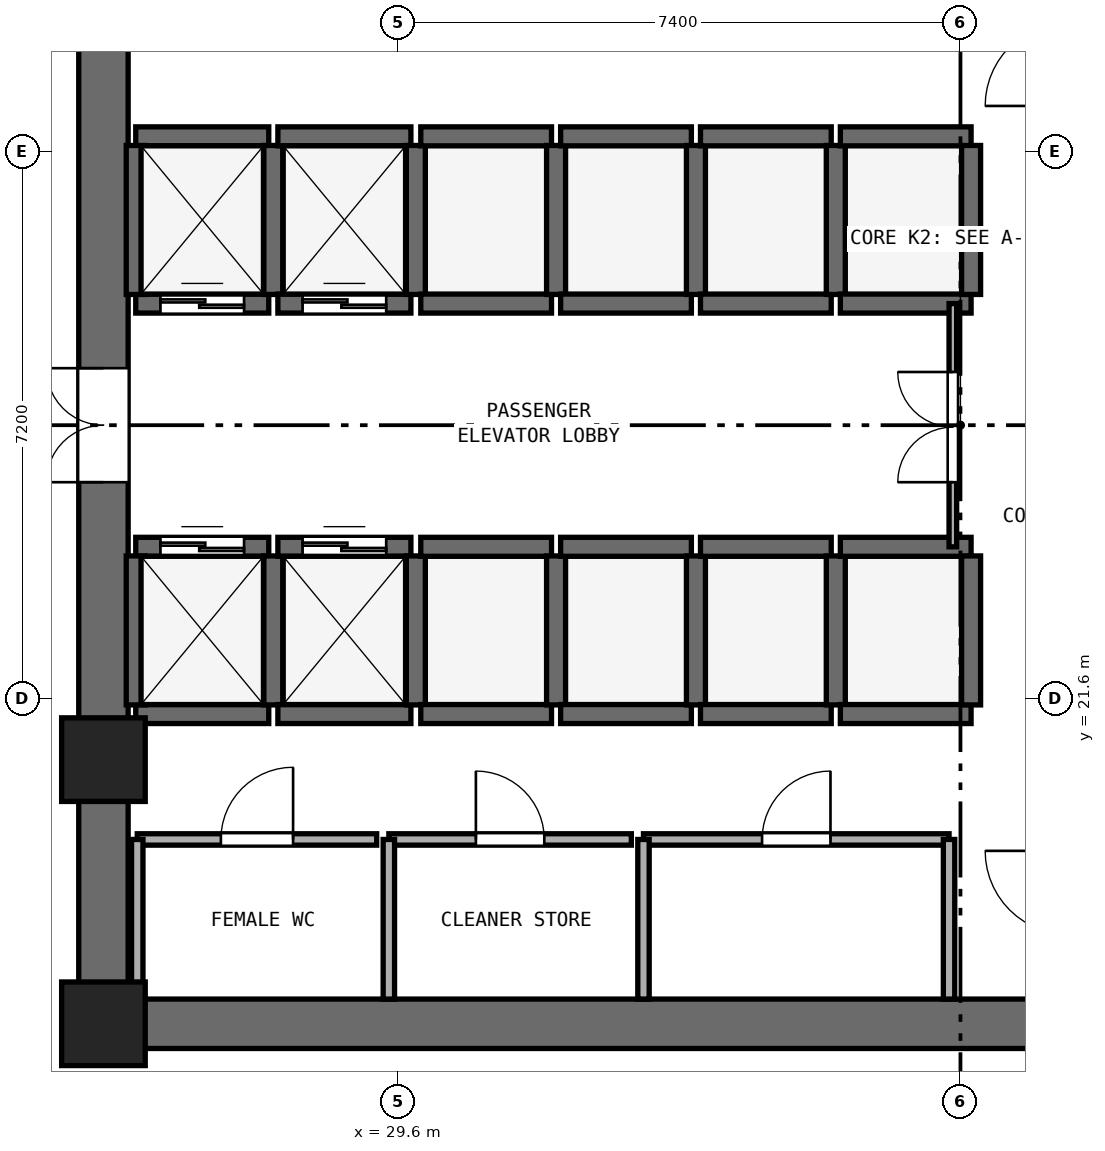
"""IFC4 building model, lengths in metres.
Left out: names, types, materials, properties, quantities, classifications, styles, units other than length and angle.
Written with IfcOpenShell. Run it as: python <this file> out.ifc"""

import sys

from ifc_helpers import new_model, si_unit, direction, frame, frame_2d, origin, origin_2d, place, context, subcontext, project, spatial, rectangle, extrude, element, fill, save


model = new_model("IFC4")
c1 = context("Model", 3, precision=1e-05, world=origin(), true_north=direction((0.0, 1.0)))
c2 = subcontext(c1, "Body", "Model", "MODEL_VIEW")
j1 = project(units=[si_unit("LENGTHUNIT", "METRE"), si_unit("PLANEANGLEUNIT", "RADIAN")], contexts=[c1])
p1 = place(None, origin())
s1 = spatial("IfcSite", under=j1, at=p1, CompositionType="ELEMENT")
p2 = place(p1, origin())
s2 = spatial("IfcBuilding", under=s1, at=p2, CompositionType="ELEMENT")
p3 = place(p2, frame((0.0, 0.0, 20.0)))
s3 = spatial("IfcBuildingStorey", under=s2, at=p3, CompositionType="ELEMENT", Elevation=20.0)
p4 = place(p3, frame((25.4, 17.325, 0.0), z_axis=(0.0, 0.0, 1.0), x_axis=(1.0, 0.0, 0.0)))
e1 = element("IfcWall", 1, at=p4, inside=s3, PredefinedType="SHEAR", context=c2, shape_type="SweptSolid", body=[
    extrude(rectangle(XDim=23.2, YDim=0.65, at=frame_2d((11.6, 0.0))), origin(), (0.0, 0.0, 1.0), 4.6),
])
p5 = place(p3, frame((25.725, 17.65, 0.0), z_axis=(0.0, 0.0, 1.0), x_axis=(0.0, 1.0, 0.0)))
e2 = element("IfcWall", 2, at=p5, inside=s3, PredefinedType="SHEAR", context=c2, shape_type="SweptSolid", body=[
    extrude(rectangle(XDim=15.1, YDim=0.65, at=frame_2d((7.55, 0.0))), origin(), (0.0, 0.0, 1.0), 4.6),
])
p6 = place(p5, frame((6.8, 0.0, 0.0)))
e3 = element("IfcOpeningElement", 3, at=p6, cuts=e2, PredefinedType="OPENING", context=c2, shape_type="SweptSolid", body=[
    extrude(rectangle(XDim=1.5, YDim=2.15, at=frame_2d((0.75, 1.075))), frame((0.0, 0.335, 0.0), z_axis=(0.0, -1.0, 0.0), x_axis=(1.0, 0.0, 0.0)), (0.0, 0.0, 1.0), 0.67),
])
for number, where, z_axis, x_axis in (
    (4, (25.725, 17.325, 0.0), (0.0, 0.0, 1.0), (1.0, 0.0, 0.0)),
    (5, (25.725, 20.8, 0.0), (0.0, 0.0, 1.0), (1.0, 0.0, 0.0)),
):
    element("IfcColumn", number, at=place(p3, frame(where, z_axis=z_axis, x_axis=x_axis)), inside=s3, PredefinedType="PILASTER", context=c2, shape_type="SweptSolid", body=[
        extrude(rectangle(XDim=1.1, YDim=1.1, at=origin_2d()), origin(), (0.0, 0.0, 1.0), 5.0),
    ])
p7 = place(p3, frame((26.15, 26.8, 0.0), z_axis=(0.0, 0.0, 1.0), x_axis=(1.0, 0.0, 0.0)))
e6 = element("IfcWall", 6, at=p7, inside=s3, PredefinedType="SHEAR", context=c2, shape_type="SweptSolid", body=[
    extrude(rectangle(XDim=1.75, YDim=0.25, at=frame_2d((0.875, 0.0))), origin(), (0.0, 0.0, 1.0), 4.6),
])
p8 = place(p7, frame((0.325, 0.0, 0.0)))
e7 = element("IfcOpeningElement", 7, at=p8, cuts=e6, PredefinedType="OPENING", context=c2, shape_type="SweptSolid", body=[
    extrude(rectangle(XDim=1.1, YDim=2.15, at=frame_2d((0.55, 1.075))), frame((0.0, 0.135, 0.0), z_axis=(0.0, -1.0, 0.0), x_axis=(1.0, 0.0, 0.0)), (0.0, 0.0, 1.0), 0.27),
])
p9 = place(p3, frame((26.15, 29.0, 0.0), z_axis=(0.0, 0.0, 1.0), x_axis=(1.0, 0.0, 0.0)))
e8 = element("IfcWall", 8, at=p9, inside=s3, PredefinedType="SHEAR", context=c2, shape_type="SweptSolid", body=[
    extrude(rectangle(XDim=1.75, YDim=0.25, at=frame_2d((0.875, 0.0))), origin(), (0.0, 0.0, 1.0), 4.6),
])
for number, where, z_axis, x_axis in (
    (9, (26.15, 26.92, 0.0), (0.0, 0.0, 1.0), (0.0, 1.0, 0.0)),
    (10, (27.96, 26.92, 0.0), (0.0, 0.0, 1.0), (0.0, 1.0, 0.0)),
):
    element("IfcWall", number, at=place(p3, frame(where, z_axis=z_axis, x_axis=x_axis)), inside=s3, PredefinedType="SHEAR", context=c2, shape_type="SweptSolid", body=[
        extrude(rectangle(XDim=1.96, YDim=0.25, at=frame_2d((0.98, 0.0))), origin(), (0.0, 0.0, 1.0), 4.6),
    ])
p10 = place(p3, frame((28.02, 26.8, 0.0), z_axis=(0.0, 0.0, 1.0), x_axis=(1.0, 0.0, 0.0)))
e11 = element("IfcWall", 11, at=p10, inside=s3, PredefinedType="SHEAR", context=c2, shape_type="SweptSolid", body=[
    extrude(rectangle(XDim=1.75, YDim=0.25, at=frame_2d((0.875, 0.0))), origin(), (0.0, 0.0, 1.0), 4.6),
])
p11 = place(p10, frame((0.325, 0.0, 0.0)))
e12 = element("IfcOpeningElement", 12, at=p11, cuts=e11, PredefinedType="OPENING", context=c2, shape_type="SweptSolid", body=[
    extrude(rectangle(XDim=1.1, YDim=2.15, at=frame_2d((0.55, 1.075))), frame((0.0, 0.135, 0.0), z_axis=(0.0, -1.0, 0.0), x_axis=(1.0, 0.0, 0.0)), (0.0, 0.0, 1.0), 0.27),
])
p12 = place(p3, frame((28.02, 29.0, 0.0), z_axis=(0.0, 0.0, 1.0), x_axis=(1.0, 0.0, 0.0)))
e13 = element("IfcWall", 13, at=p12, inside=s3, PredefinedType="SHEAR", context=c2, shape_type="SweptSolid", body=[
    extrude(rectangle(XDim=1.75, YDim=0.25, at=frame_2d((0.875, 0.0))), origin(), (0.0, 0.0, 1.0), 4.6),
])
p13 = place(p3, frame((29.835, 26.92, 0.0), z_axis=(0.0, 0.0, 1.0), x_axis=(0.0, 1.0, 0.0)))
e14 = element("IfcWall", 14, at=p13, inside=s3, PredefinedType="SHEAR", context=c2, shape_type="SweptSolid", body=[
    extrude(rectangle(XDim=1.96, YDim=0.25, at=frame_2d((0.98, 0.0))), origin(), (0.0, 0.0, 1.0), 4.6),
])
p14 = place(p3, frame((26.15, 21.4, 0.0), z_axis=(0.0, 0.0, 1.0), x_axis=(1.0, 0.0, 0.0)))
e15 = element("IfcWall", 15, at=p14, inside=s3, PredefinedType="SHEAR", context=c2, shape_type="SweptSolid", body=[
    extrude(rectangle(XDim=1.75, YDim=0.25, at=frame_2d((0.875, 0.0))), origin(), (0.0, 0.0, 1.0), 4.6),
])
p15 = place(p3, frame((26.15, 23.6, 0.0), z_axis=(0.0, 0.0, 1.0), x_axis=(1.0, 0.0, 0.0)))
e16 = element("IfcWall", 16, at=p15, inside=s3, PredefinedType="SHEAR", context=c2, shape_type="SweptSolid", body=[
    extrude(rectangle(XDim=1.75, YDim=0.25, at=frame_2d((0.875, 0.0))), origin(), (0.0, 0.0, 1.0), 4.6),
])
p16 = place(p15, frame((0.325, 0.0, 0.0)))
e17 = element("IfcOpeningElement", 17, at=p16, cuts=e16, PredefinedType="OPENING", context=c2, shape_type="SweptSolid", body=[
    extrude(rectangle(XDim=1.1, YDim=2.15, at=frame_2d((0.55, 1.075))), frame((0.0, 0.135, 0.0), z_axis=(0.0, -1.0, 0.0), x_axis=(1.0, 0.0, 0.0)), (0.0, 0.0, 1.0), 0.27),
])
for number, where, z_axis, x_axis in (
    (18, (26.15, 21.52, 0.0), (0.0, 0.0, 1.0), (0.0, 1.0, 0.0)),
    (19, (27.96, 21.52, 0.0), (0.0, 0.0, 1.0), (0.0, 1.0, 0.0)),
):
    element("IfcWall", number, at=place(p3, frame(where, z_axis=z_axis, x_axis=x_axis)), inside=s3, PredefinedType="SHEAR", context=c2, shape_type="SweptSolid", body=[
        extrude(rectangle(XDim=1.96, YDim=0.25, at=frame_2d((0.98, 0.0))), origin(), (0.0, 0.0, 1.0), 4.6),
    ])
p17 = place(p3, frame((28.02, 21.4, 0.0), z_axis=(0.0, 0.0, 1.0), x_axis=(1.0, 0.0, 0.0)))
e20 = element("IfcWall", 20, at=p17, inside=s3, PredefinedType="SHEAR", context=c2, shape_type="SweptSolid", body=[
    extrude(rectangle(XDim=1.75, YDim=0.25, at=frame_2d((0.875, 0.0))), origin(), (0.0, 0.0, 1.0), 4.6),
])
p18 = place(p3, frame((28.02, 23.6, 0.0), z_axis=(0.0, 0.0, 1.0), x_axis=(1.0, 0.0, 0.0)))
e21 = element("IfcWall", 21, at=p18, inside=s3, PredefinedType="SHEAR", context=c2, shape_type="SweptSolid", body=[
    extrude(rectangle(XDim=1.75, YDim=0.25, at=frame_2d((0.875, 0.0))), origin(), (0.0, 0.0, 1.0), 4.6),
])
p19 = place(p18, frame((0.325, 0.0, 0.0)))
e22 = element("IfcOpeningElement", 22, at=p19, cuts=e21, PredefinedType="OPENING", context=c2, shape_type="SweptSolid", body=[
    extrude(rectangle(XDim=1.1, YDim=2.15, at=frame_2d((0.55, 1.075))), frame((0.0, 0.135, 0.0), z_axis=(0.0, -1.0, 0.0), x_axis=(1.0, 0.0, 0.0)), (0.0, 0.0, 1.0), 0.27),
])
p20 = place(p3, frame((29.835, 21.52, 0.0), z_axis=(0.0, 0.0, 1.0), x_axis=(0.0, 1.0, 0.0)))
e23 = element("IfcWall", 23, at=p20, inside=s3, PredefinedType="SHEAR", context=c2, shape_type="SweptSolid", body=[
    extrude(rectangle(XDim=1.96, YDim=0.25, at=frame_2d((0.98, 0.0))), origin(), (0.0, 0.0, 1.0), 4.6),
])
for number, where, z_axis, x_axis in (
    (24, (29.9, 21.4, 0.0), (0.0, 0.0, 1.0), (1.0, 0.0, 0.0)),
    (25, (29.9, 23.6, 0.0), (0.0, 0.0, 1.0), (1.0, 0.0, 0.0)),
):
    element("IfcWall", number, at=place(p3, frame(where, z_axis=z_axis, x_axis=x_axis)), inside=s3, PredefinedType="SHEAR", context=c2, shape_type="SweptSolid", body=[
        extrude(rectangle(XDim=1.72, YDim=0.25, at=frame_2d((0.86, 0.0))), origin(), (0.0, 0.0, 1.0), 4.6),
    ])
p21 = place(p3, frame((31.68, 21.52, 0.0), z_axis=(0.0, 0.0, 1.0), x_axis=(0.0, 1.0, 0.0)))
e26 = element("IfcWall", 26, at=p21, inside=s3, PredefinedType="SHEAR", context=c2, shape_type="SweptSolid", body=[
    extrude(rectangle(XDim=1.96, YDim=0.25, at=frame_2d((0.98, 0.0))), origin(), (0.0, 0.0, 1.0), 4.6),
])
for number, where, z_axis, x_axis in (
    (27, (31.74, 21.4, 0.0), (0.0, 0.0, 1.0), (1.0, 0.0, 0.0)),
    (28, (31.74, 23.6, 0.0), (0.0, 0.0, 1.0), (1.0, 0.0, 0.0)),
):
    element("IfcWall", number, at=place(p3, frame(where, z_axis=z_axis, x_axis=x_axis)), inside=s3, PredefinedType="SHEAR", context=c2, shape_type="SweptSolid", body=[
        extrude(rectangle(XDim=1.72, YDim=0.25, at=frame_2d((0.86, 0.0))), origin(), (0.0, 0.0, 1.0), 4.6),
    ])
p22 = place(p3, frame((33.52, 21.52, 0.0), z_axis=(0.0, 0.0, 1.0), x_axis=(0.0, 1.0, 0.0)))
e29 = element("IfcWall", 29, at=p22, inside=s3, PredefinedType="SHEAR", context=c2, shape_type="SweptSolid", body=[
    extrude(rectangle(XDim=1.96, YDim=0.25, at=frame_2d((0.98, 0.0))), origin(), (0.0, 0.0, 1.0), 4.6),
])
for number, where, z_axis, x_axis in (
    (30, (33.58, 21.4, 0.0), (0.0, 0.0, 1.0), (1.0, 0.0, 0.0)),
    (31, (33.58, 23.6, 0.0), (0.0, 0.0, 1.0), (1.0, 0.0, 0.0)),
):
    element("IfcWall", number, at=place(p3, frame(where, z_axis=z_axis, x_axis=x_axis)), inside=s3, PredefinedType="SHEAR", context=c2, shape_type="SweptSolid", body=[
        extrude(rectangle(XDim=1.72, YDim=0.25, at=frame_2d((0.86, 0.0))), origin(), (0.0, 0.0, 1.0), 4.6),
    ])
p23 = place(p3, frame((35.36, 21.52, 0.0), z_axis=(0.0, 0.0, 1.0), x_axis=(0.0, 1.0, 0.0)))
e32 = element("IfcWall", 32, at=p23, inside=s3, PredefinedType="SHEAR", context=c2, shape_type="SweptSolid", body=[
    extrude(rectangle(XDim=1.96, YDim=0.25, at=frame_2d((0.98, 0.0))), origin(), (0.0, 0.0, 1.0), 4.6),
])
for number, where, z_axis, x_axis in (
    (33, (35.42, 21.4, 0.0), (0.0, 0.0, 1.0), (1.0, 0.0, 0.0)),
    (34, (35.42, 23.6, 0.0), (0.0, 0.0, 1.0), (1.0, 0.0, 0.0)),
):
    element("IfcWall", number, at=place(p3, frame(where, z_axis=z_axis, x_axis=x_axis)), inside=s3, PredefinedType="SHEAR", context=c2, shape_type="SweptSolid", body=[
        extrude(rectangle(XDim=1.72, YDim=0.25, at=frame_2d((0.86, 0.0))), origin(), (0.0, 0.0, 1.0), 4.6),
    ])
p24 = place(p3, frame((37.14, 21.52, 0.0), z_axis=(0.0, 0.0, 1.0), x_axis=(0.0, 1.0, 0.0)))
e35 = element("IfcWall", 35, at=p24, inside=s3, PredefinedType="SHEAR", context=c2, shape_type="SweptSolid", body=[
    extrude(rectangle(XDim=1.96, YDim=0.25, at=frame_2d((0.98, 0.0))), origin(), (0.0, 0.0, 1.0), 4.6),
])
for number, where, z_axis, x_axis in (
    (36, (29.9, 26.8, 0.0), (0.0, 0.0, 1.0), (1.0, 0.0, 0.0)),
    (37, (29.9, 29.0, 0.0), (0.0, 0.0, 1.0), (1.0, 0.0, 0.0)),
):
    element("IfcWall", number, at=place(p3, frame(where, z_axis=z_axis, x_axis=x_axis)), inside=s3, PredefinedType="SHEAR", context=c2, shape_type="SweptSolid", body=[
        extrude(rectangle(XDim=1.72, YDim=0.25, at=frame_2d((0.86, 0.0))), origin(), (0.0, 0.0, 1.0), 4.6),
    ])
p25 = place(p3, frame((31.68, 26.92, 0.0), z_axis=(0.0, 0.0, 1.0), x_axis=(0.0, 1.0, 0.0)))
e38 = element("IfcWall", 38, at=p25, inside=s3, PredefinedType="SHEAR", context=c2, shape_type="SweptSolid", body=[
    extrude(rectangle(XDim=1.96, YDim=0.25, at=frame_2d((0.98, 0.0))), origin(), (0.0, 0.0, 1.0), 4.6),
])
for number, where, z_axis, x_axis in (
    (39, (31.74, 26.8, 0.0), (0.0, 0.0, 1.0), (1.0, 0.0, 0.0)),
    (40, (31.74, 29.0, 0.0), (0.0, 0.0, 1.0), (1.0, 0.0, 0.0)),
):
    element("IfcWall", number, at=place(p3, frame(where, z_axis=z_axis, x_axis=x_axis)), inside=s3, PredefinedType="SHEAR", context=c2, shape_type="SweptSolid", body=[
        extrude(rectangle(XDim=1.72, YDim=0.25, at=frame_2d((0.86, 0.0))), origin(), (0.0, 0.0, 1.0), 4.6),
    ])
p26 = place(p3, frame((33.52, 26.92, 0.0), z_axis=(0.0, 0.0, 1.0), x_axis=(0.0, 1.0, 0.0)))
e41 = element("IfcWall", 41, at=p26, inside=s3, PredefinedType="SHEAR", context=c2, shape_type="SweptSolid", body=[
    extrude(rectangle(XDim=1.96, YDim=0.25, at=frame_2d((0.98, 0.0))), origin(), (0.0, 0.0, 1.0), 4.6),
])
for number, where, z_axis, x_axis in (
    (42, (33.58, 26.8, 0.0), (0.0, 0.0, 1.0), (1.0, 0.0, 0.0)),
    (43, (33.58, 29.0, 0.0), (0.0, 0.0, 1.0), (1.0, 0.0, 0.0)),
):
    element("IfcWall", number, at=place(p3, frame(where, z_axis=z_axis, x_axis=x_axis)), inside=s3, PredefinedType="SHEAR", context=c2, shape_type="SweptSolid", body=[
        extrude(rectangle(XDim=1.72, YDim=0.25, at=frame_2d((0.86, 0.0))), origin(), (0.0, 0.0, 1.0), 4.6),
    ])
p27 = place(p3, frame((35.36, 26.92, 0.0), z_axis=(0.0, 0.0, 1.0), x_axis=(0.0, 1.0, 0.0)))
e44 = element("IfcWall", 44, at=p27, inside=s3, PredefinedType="SHEAR", context=c2, shape_type="SweptSolid", body=[
    extrude(rectangle(XDim=1.96, YDim=0.25, at=frame_2d((0.98, 0.0))), origin(), (0.0, 0.0, 1.0), 4.6),
])
for number, where, z_axis, x_axis in (
    (45, (35.42, 26.8, 0.0), (0.0, 0.0, 1.0), (1.0, 0.0, 0.0)),
    (46, (35.42, 29.0, 0.0), (0.0, 0.0, 1.0), (1.0, 0.0, 0.0)),
):
    element("IfcWall", number, at=place(p3, frame(where, z_axis=z_axis, x_axis=x_axis)), inside=s3, PredefinedType="SHEAR", context=c2, shape_type="SweptSolid", body=[
        extrude(rectangle(XDim=1.72, YDim=0.25, at=frame_2d((0.86, 0.0))), origin(), (0.0, 0.0, 1.0), 4.6),
    ])
p28 = place(p3, frame((37.14, 26.92, 0.0), z_axis=(0.0, 0.0, 1.0), x_axis=(0.0, 1.0, 0.0)))
e47 = element("IfcWall", 47, at=p28, inside=s3, PredefinedType="SHEAR", context=c2, shape_type="SweptSolid", body=[
    extrude(rectangle(XDim=1.96, YDim=0.25, at=frame_2d((0.98, 0.0))), origin(), (0.0, 0.0, 1.0), 4.6),
])
p29 = place(p3, frame((26.17, 19.75, 0.0), z_axis=(0.0, 0.0, 1.0), x_axis=(1.0, 0.0, 0.0)))
e48 = element("IfcWall", 48, at=p29, inside=s3, PredefinedType="PARTITIONING", context=c2, shape_type="SweptSolid", body=[
    extrude(rectangle(XDim=3.15, YDim=0.15, at=frame_2d((1.575, 0.0))), origin(), (0.0, 0.0, 1.0), 4.6),
])
p30 = place(p29, frame((1.1, 0.0, 0.0)))
e49 = element("IfcOpeningElement", 49, at=p30, cuts=e48, PredefinedType="OPENING", context=c2, shape_type="SweptSolid", body=[
    extrude(rectangle(XDim=0.95, YDim=2.1, at=frame_2d((0.475, 1.05))), frame((0.0, 0.085, 0.0), z_axis=(0.0, -1.0, 0.0), x_axis=(1.0, 0.0, 0.0)), (0.0, 0.0, 1.0), 0.17),
])
p31 = place(p3, frame((26.17, 17.65, 0.0), z_axis=(0.0, 0.0, 1.0), x_axis=(0.0, 1.0, 0.0)))
e50 = element("IfcWall", 50, at=p31, inside=s3, PredefinedType="PARTITIONING", context=c2, shape_type="SweptSolid", body=[
    extrude(rectangle(XDim=2.1, YDim=0.15, at=frame_2d((1.05, 0.0))), origin(), (0.0, 0.0, 1.0), 4.6),
])
p32 = place(p3, frame((29.48, 19.75, 0.0), z_axis=(0.0, 0.0, 1.0), x_axis=(1.0, 0.0, 0.0)))
e51 = element("IfcWall", 51, at=p32, inside=s3, PredefinedType="PARTITIONING", context=c2, shape_type="SweptSolid", body=[
    extrude(rectangle(XDim=3.19, YDim=0.15, at=frame_2d((1.595, 0.0))), origin(), (0.0, 0.0, 1.0), 4.6),
])
p33 = place(p32, frame((1.145, 0.0, 0.0)))
e52 = element("IfcOpeningElement", 52, at=p33, cuts=e51, PredefinedType="OPENING", context=c2, shape_type="SweptSolid", body=[
    extrude(rectangle(XDim=0.9, YDim=2.1, at=frame_2d((0.45, 1.05))), frame((0.0, 0.085, 0.0), z_axis=(0.0, -1.0, 0.0), x_axis=(1.0, 0.0, 0.0)), (0.0, 0.0, 1.0), 0.17),
])
p34 = place(p3, frame((29.48, 17.65, 0.0), z_axis=(0.0, 0.0, 1.0), x_axis=(0.0, 1.0, 0.0)))
e53 = element("IfcWall", 53, at=p34, inside=s3, PredefinedType="PARTITIONING", context=c2, shape_type="SweptSolid", body=[
    extrude(rectangle(XDim=2.1, YDim=0.15, at=frame_2d((1.05, 0.0))), origin(), (0.0, 0.0, 1.0), 4.6),
])
p35 = place(p3, frame((32.83, 19.75, 0.0), z_axis=(0.0, 0.0, 1.0), x_axis=(1.0, 0.0, 0.0)))
e54 = element("IfcWall", 54, at=p35, inside=s3, PredefinedType="PARTITIONING", context=c2, shape_type="SweptSolid", body=[
    extrude(rectangle(XDim=4.02, YDim=0.15, at=frame_2d((2.01, 0.0))), origin(), (0.0, 0.0, 1.0), 4.6),
])
p36 = place(p35, frame((1.56, 0.0, 0.0)))
e55 = element("IfcOpeningElement", 55, at=p36, cuts=e54, PredefinedType="OPENING", context=c2, shape_type="SweptSolid", body=[
    extrude(rectangle(XDim=0.9, YDim=2.1, at=frame_2d((0.45, 1.05))), frame((0.0, 0.085, 0.0), z_axis=(0.0, -1.0, 0.0), x_axis=(1.0, 0.0, 0.0)), (0.0, 0.0, 1.0), 0.17),
])
for number, where, z_axis, x_axis in (
    (56, (32.83, 17.65, 0.0), (0.0, 0.0, 1.0), (0.0, 1.0, 0.0)),
    (57, (36.85, 17.65, 0.0), (0.0, 0.0, 1.0), (0.0, 1.0, 0.0)),
):
    element("IfcWall", number, at=place(p3, frame(where, z_axis=z_axis, x_axis=x_axis)), inside=s3, PredefinedType="PARTITIONING", context=c2, shape_type="SweptSolid", body=[
        extrude(rectangle(XDim=2.1, YDim=0.15, at=frame_2d((1.05, 0.0))), origin(), (0.0, 0.0, 1.0), 4.6),
    ])
p37 = place(p3, frame((36.9, 23.6, 0.0), z_axis=(0.0, 0.0, 1.0), x_axis=(0.0, 1.0, 0.0)))
e58 = element("IfcWall", 58, at=p37, inside=s3, PredefinedType="PARTITIONING", context=c2, shape_type="SweptSolid", body=[
    extrude(rectangle(XDim=3.2, YDim=0.1, at=frame_2d((1.6, 0.0))), origin(), (0.0, 0.0, 1.0), 4.6),
])
p38 = place(p37, frame((0.85, 0.0, 0.0)))
e59 = element("IfcOpeningElement", 59, at=p38, cuts=e58, PredefinedType="OPENING", context=c2, shape_type="SweptSolid", body=[
    extrude(rectangle(XDim=1.45, YDim=2.12, at=frame_2d((0.725, 1.06))), frame((0.0, 0.06, 0.0), z_axis=(0.0, -1.0, 0.0), x_axis=(1.0, 0.0, 0.0)), (0.0, 0.0, 1.0), 0.12),
])
p39 = place(p8, origin())
e60 = element("IfcDoor", 60, at=p39, inside=s3, OperationType="DOUBLE_DOOR_SLIDING", PredefinedType="DOOR", context=c2, shape_type="SweptSolid", body=[
    extrude(rectangle(XDim=1.1, YDim=2.15, at=frame_2d((0.55, 1.075))), frame((0.0, 0.025, 0.0), z_axis=(0.0, -1.0, 0.0), x_axis=(1.0, 0.0, 0.0)), (0.0, 0.0, 1.0), 0.05),
])
fill(e7, e60)
p40 = place(p11, origin())
e61 = element("IfcDoor", 61, at=p40, inside=s3, OperationType="DOUBLE_DOOR_SLIDING", PredefinedType="DOOR", context=c2, shape_type="SweptSolid", body=[
    extrude(rectangle(XDim=1.1, YDim=2.15, at=frame_2d((0.55, 1.075))), frame((0.0, 0.025, 0.0), z_axis=(0.0, -1.0, 0.0), x_axis=(1.0, 0.0, 0.0)), (0.0, 0.0, 1.0), 0.05),
])
fill(e12, e61)
p41 = place(p16, origin())
e62 = element("IfcDoor", 62, at=p41, inside=s3, OperationType="DOUBLE_DOOR_SLIDING", PredefinedType="DOOR", context=c2, shape_type="SweptSolid", body=[
    extrude(rectangle(XDim=1.1, YDim=2.15, at=frame_2d((0.55, 1.075))), frame((0.0, 0.025, 0.0), z_axis=(0.0, -1.0, 0.0), x_axis=(1.0, 0.0, 0.0)), (0.0, 0.0, 1.0), 0.05),
])
fill(e17, e62)
p42 = place(p19, origin())
e63 = element("IfcDoor", 63, at=p42, inside=s3, OperationType="DOUBLE_DOOR_SLIDING", PredefinedType="DOOR", context=c2, shape_type="SweptSolid", body=[
    extrude(rectangle(XDim=1.1, YDim=2.15, at=frame_2d((0.55, 1.075))), frame((0.0, 0.025, 0.0), z_axis=(0.0, -1.0, 0.0), x_axis=(1.0, 0.0, 0.0)), (0.0, 0.0, 1.0), 0.05),
])
fill(e22, e63)
p43 = place(p6, origin())
e64 = element("IfcDoor", 64, at=p43, inside=s3, OperationType="DOUBLE_DOOR_SINGLE_SWING", PredefinedType="DOOR", context=c2, shape_type="SweptSolid", body=[
    extrude(rectangle(XDim=1.5, YDim=2.15, at=frame_2d((0.75, 1.075))), frame((0.0, 0.025, 0.0), z_axis=(0.0, -1.0, 0.0), x_axis=(1.0, 0.0, 0.0)), (0.0, 0.0, 1.0), 0.05),
])
fill(e3, e64)
p44 = place(p30, origin())
e65 = element("IfcDoor", 65, at=p44, inside=s3, OperationType="SINGLE_SWING_RIGHT", PredefinedType="DOOR", context=c2, shape_type="SweptSolid", body=[
    extrude(rectangle(XDim=0.95, YDim=2.1, at=frame_2d((0.475, 1.05))), frame((0.0, 0.025, 0.0), z_axis=(0.0, -1.0, 0.0), x_axis=(1.0, 0.0, 0.0)), (0.0, 0.0, 1.0), 0.05),
])
fill(e49, e65)
p45 = place(p33, origin())
e66 = element("IfcDoor", 66, at=p45, inside=s3, OperationType="SINGLE_SWING_LEFT", PredefinedType="DOOR", context=c2, shape_type="SweptSolid", body=[
    extrude(rectangle(XDim=0.9, YDim=2.1, at=frame_2d((0.45, 1.05))), frame((0.0, 0.025, 0.0), z_axis=(0.0, -1.0, 0.0), x_axis=(1.0, 0.0, 0.0)), (0.0, 0.0, 1.0), 0.05),
])
fill(e52, e66)
p46 = place(p36, origin())
e67 = element("IfcDoor", 67, at=p46, inside=s3, OperationType="SINGLE_SWING_RIGHT", PredefinedType="DOOR", context=c2, shape_type="SweptSolid", body=[
    extrude(rectangle(XDim=0.9, YDim=2.1, at=frame_2d((0.45, 1.05))), frame((0.0, 0.025, 0.0), z_axis=(0.0, -1.0, 0.0), x_axis=(1.0, 0.0, 0.0)), (0.0, 0.0, 1.0), 0.05),
])
fill(e55, e67)
p47 = place(p38, origin())
e68 = element("IfcDoor", 68, at=p47, inside=s3, OperationType="DOUBLE_DOOR_SINGLE_SWING", PredefinedType="DOOR", context=c2, shape_type="SweptSolid", body=[
    extrude(rectangle(XDim=1.45, YDim=2.12, at=frame_2d((0.725, 1.06))), frame((0.0, 0.025, 0.0), z_axis=(0.0, -1.0, 0.0), x_axis=(1.0, 0.0, 0.0)), (0.0, 0.0, 1.0), 0.05),
])
fill(e59, e68)
save(model, sys.argv[1])
